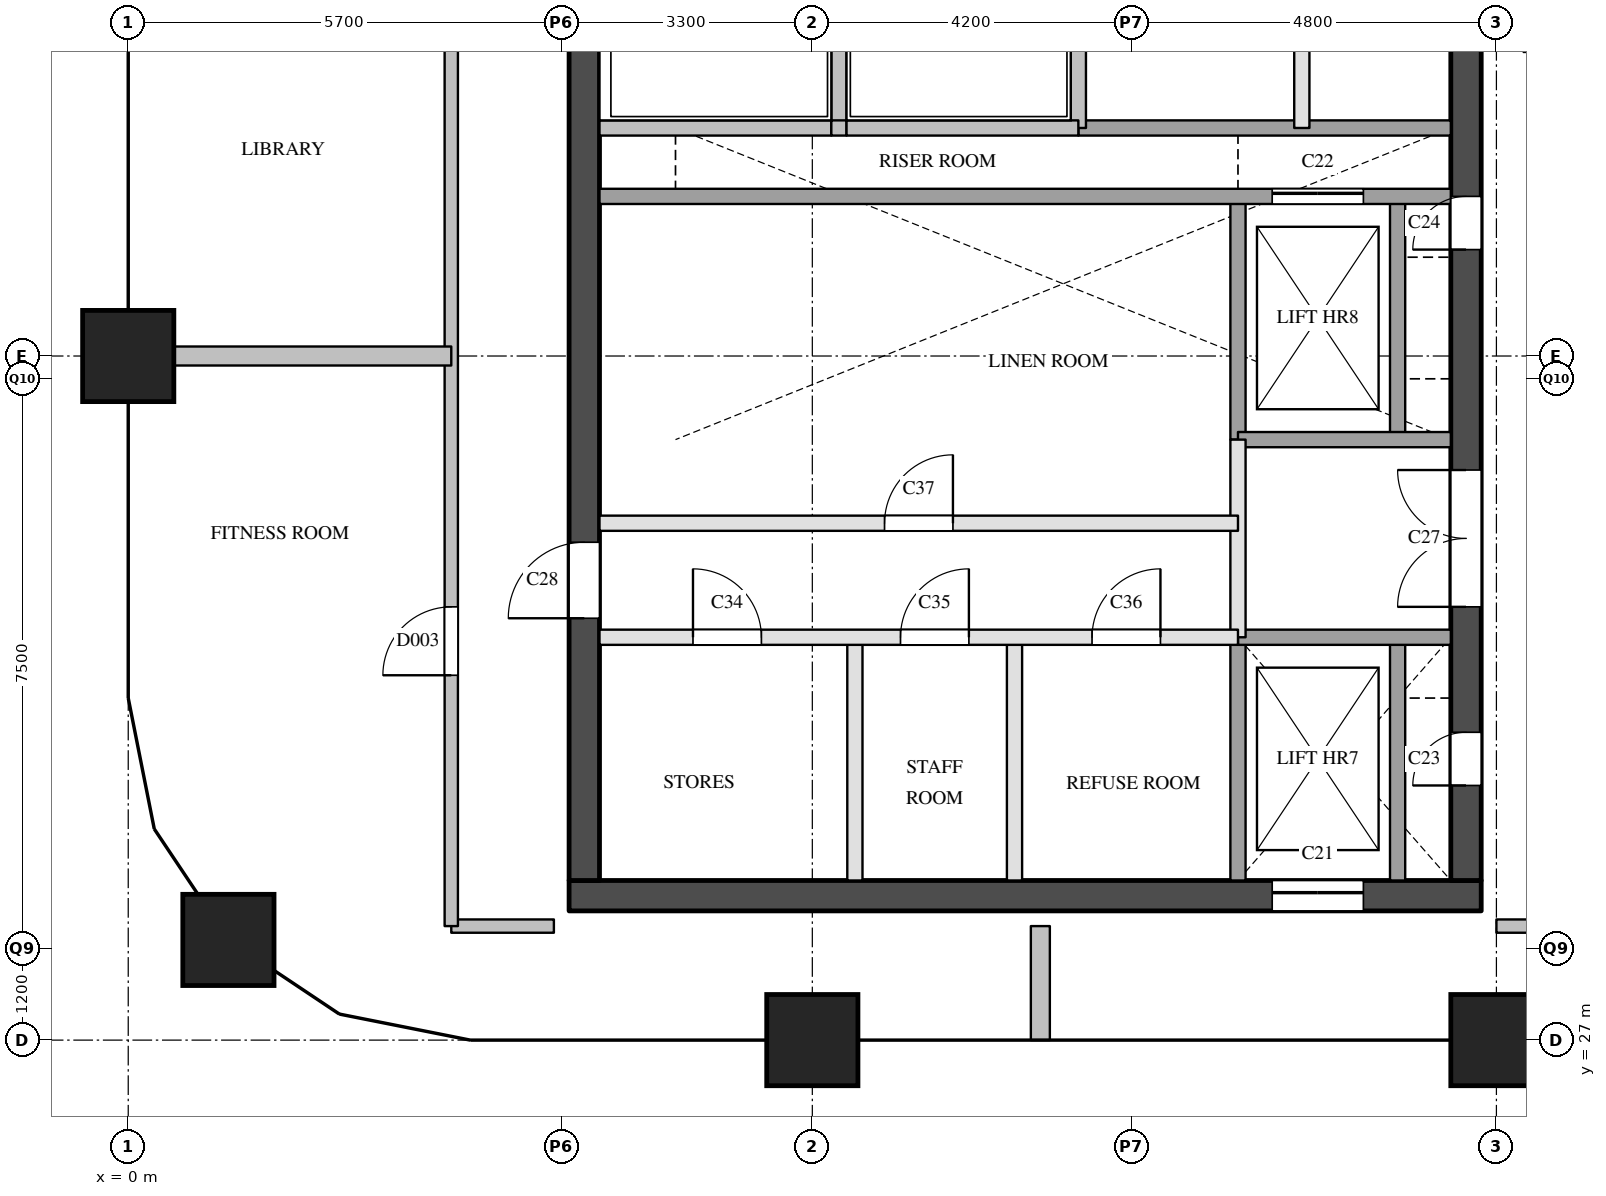
"""IFC4 building model, lengths in metres.
Left out: names, types, materials, properties, quantities, classifications, styles, units other than length and angle.
Written with IfcOpenShell. Run it as: python <this file> out.ifc"""

import sys

from ifc_helpers import new_model, si_unit, direction, frame, frame_2d, origin, origin_2d, place, context, subcontext, project, spatial, rectangle, extrude, element, fill, save


model = new_model("IFC4")
c1 = context("Model", 3, precision=1e-05, world=origin(), true_north=direction((0.0, 1.0)))
c2 = subcontext(c1, "Body", "Model", "MODEL_VIEW")
j1 = project(units=[si_unit("LENGTHUNIT", "METRE"), si_unit("PLANEANGLEUNIT", "RADIAN")], contexts=[c1])
p1 = place(None, origin())
s1 = spatial("IfcSite", under=j1, at=p1, CompositionType="ELEMENT")
p2 = place(p1, origin())
s2 = spatial("IfcBuilding", under=s1, at=p2, CompositionType="ELEMENT")
p3 = place(p2, frame((0.0, 0.0, 226.7)))
s3 = spatial("IfcBuildingStorey", under=s2, at=p3, CompositionType="ELEMENT", Elevation=226.7)
for number, where, z_axis, x_axis in (
    (1, (1.318, 28.318, 0.0), (0.0, 0.0, 1.0), (1.0, 0.0, 0.0)),
    (2, (0.0, 36.0, 0.0), (0.0, 0.0, 1.0), (1.0, 0.0, 0.0)),
    (3, (9.0, 27.0, 0.0), (0.0, 0.0, 1.0), (1.0, 0.0, 0.0)),
    (4, (18.0, 27.0, 0.0), (0.0, 0.0, 1.0), (1.0, 0.0, 0.0)),
):
    element("IfcColumn", number, at=place(p3, frame(where, z_axis=z_axis, x_axis=x_axis)), inside=s3, PredefinedType="COLUMN", context=c2, shape_type="SweptSolid", body=[
        extrude(rectangle(XDim=1.2, YDim=1.2, at=origin_2d()), origin(), (0.0, 0.0, 1.0), 3.9),
    ])
p4 = place(p3, frame((5.8, 28.9, 0.0), z_axis=(0.0, 0.0, 1.0), x_axis=(1.0, 0.0, 0.0)))
e5 = element("IfcWall", 5, at=p4, inside=s3, PredefinedType="SHEAR", context=c2, shape_type="SweptSolid", body=[
    extrude(rectangle(XDim=12.0, YDim=0.4, at=frame_2d((6.0, 0.0))), origin(), (0.0, 0.0, 1.0), 3.5),
])
p5 = place(p4, frame((9.25, 0.0, 0.0)))
e6 = element("IfcOpeningElement", 6, at=p5, cuts=e5, PredefinedType="OPENING", context=c2, shape_type="SweptSolid", body=[
    extrude(rectangle(XDim=1.2, YDim=2.1, at=frame_2d((0.6, 1.05))), frame((0.0, 0.21, 0.0), z_axis=(0.0, -1.0, 0.0), x_axis=(1.0, 0.0, 0.0)), (0.0, 0.0, 1.0), 0.42),
])
p6 = place(p3, frame((6.0, 29.1, 0.0), z_axis=(0.0, 0.0, 1.0), x_axis=(0.0, 1.0, 0.0)))
e7 = element("IfcWall", 7, at=p6, inside=s3, PredefinedType="SHEAR", context=c2, shape_type="SweptSolid", body=[
    extrude(rectangle(XDim=20.3, YDim=0.4, at=frame_2d((10.15, 0.0))), origin(), (0.0, 0.0, 1.0), 3.5),
])
p7 = place(p6, frame((3.45, 0.0, 0.0)))
e8 = element("IfcOpeningElement", 8, at=p7, cuts=e7, PredefinedType="OPENING", context=c2, shape_type="SweptSolid", body=[
    extrude(rectangle(XDim=1.0, YDim=2.1, at=frame_2d((0.5, 1.05))), frame((0.0, 0.21, 0.0), z_axis=(0.0, -1.0, 0.0), x_axis=(1.0, 0.0, 0.0)), (0.0, 0.0, 1.0), 0.42),
])
p8 = place(p6, frame((16.4, 0.0, 0.0)))
e9 = element("IfcOpeningElement", 9, at=p8, cuts=e7, PredefinedType="OPENING", context=c2, shape_type="SweptSolid", body=[
    extrude(rectangle(XDim=1.0, YDim=2.1, at=frame_2d((0.5, 1.05))), frame((0.0, 0.21, 0.0), z_axis=(0.0, -1.0, 0.0), x_axis=(1.0, 0.0, 0.0)), (0.0, 0.0, 1.0), 0.42),
])
p9 = place(p3, frame((17.6, 29.1, 0.0), z_axis=(0.0, 0.0, 1.0), x_axis=(0.0, 1.0, 0.0)))
e10 = element("IfcWall", 10, at=p9, inside=s3, PredefinedType="SHEAR", context=c2, shape_type="SweptSolid", body=[
    extrude(rectangle(XDim=20.3, YDim=0.4, at=frame_2d((10.15, 0.0))), origin(), (0.0, 0.0, 1.0), 3.5),
])
p10 = place(p9, frame((1.25, 0.0, 0.0)))
e11 = element("IfcOpeningElement", 11, at=p10, cuts=e10, PredefinedType="OPENING", context=c2, shape_type="SweptSolid", body=[
    extrude(rectangle(XDim=0.7, YDim=2.1, at=frame_2d((0.35, 1.05))), frame((0.0, 0.21, 0.0), z_axis=(0.0, -1.0, 0.0), x_axis=(1.0, 0.0, 0.0)), (0.0, 0.0, 1.0), 0.42),
])
p11 = place(p9, frame((8.3, 0.0, 0.0)))
e12 = element("IfcOpeningElement", 12, at=p11, cuts=e10, PredefinedType="OPENING", context=c2, shape_type="SweptSolid", body=[
    extrude(rectangle(XDim=0.7, YDim=2.1, at=frame_2d((0.35, 1.05))), frame((0.0, 0.21, 0.0), z_axis=(0.0, -1.0, 0.0), x_axis=(1.0, 0.0, 0.0)), (0.0, 0.0, 1.0), 0.42),
])
p12 = place(p9, frame((3.6, 0.0, 0.0)))
e13 = element("IfcOpeningElement", 13, at=p12, cuts=e10, PredefinedType="OPENING", context=c2, shape_type="SweptSolid", body=[
    extrude(rectangle(XDim=1.8, YDim=2.1, at=frame_2d((0.9, 1.05))), frame((0.0, 0.21, 0.0), z_axis=(0.0, -1.0, 0.0), x_axis=(1.0, 0.0, 0.0)), (0.0, 0.0, 1.0), 0.42),
])
p13 = place(p3, frame((9.35, 39.0, 0.0), z_axis=(0.0, 0.0, 1.0), x_axis=(0.0, 1.0, 0.0)))
e14 = element("IfcWall", 14, at=p13, inside=s3, PredefinedType="SOLIDWALL", context=c2, shape_type="SweptSolid", body=[
    extrude(rectangle(XDim=1.9, YDim=0.2, at=frame_2d((0.95, 0.0))), origin(), (0.0, 0.0, 1.0), 3.5),
])
for number, where, z_axis, x_axis in (
    (15, (9.56, 29.1, 0.0), (0.0, 0.0, 1.0), (0.0, 1.0, 0.0)),
    (16, (11.66, 29.1, 0.0), (0.0, 0.0, 1.0), (0.0, 1.0, 0.0)),
):
    element("IfcWall", number, at=place(p3, frame(where, z_axis=z_axis, x_axis=x_axis)), inside=s3, PredefinedType="PARTITIONING", context=c2, shape_type="SweptSolid", body=[
        extrude(rectangle(XDim=3.2, YDim=0.2, at=frame_2d((1.6, 0.0))), origin(), (0.0, 0.0, 1.0), 3.5),
    ])
p14 = place(p3, frame((12.5, 39.0, 0.0), z_axis=(0.0, 0.0, 1.0), x_axis=(0.0, 1.0, 0.0)))
e17 = element("IfcWall", 17, at=p14, inside=s3, PredefinedType="SOLIDWALL", context=c2, shape_type="SweptSolid", body=[
    extrude(rectangle(XDim=1.9, YDim=0.2, at=frame_2d((0.95, 0.0))), origin(), (0.0, 0.0, 1.0), 3.5),
])
p15 = place(p3, frame((14.6, 32.3, 0.0), z_axis=(0.0, 0.0, 1.0), x_axis=(0.0, 1.0, 0.0)))
e18 = element("IfcWall", 18, at=p15, inside=s3, PredefinedType="PARTITIONING", context=c2, shape_type="SweptSolid", body=[
    extrude(rectangle(XDim=2.6, YDim=0.2, at=frame_2d((1.3, 0.0))), origin(), (0.0, 0.0, 1.0), 3.5),
])
p16 = place(p3, frame((14.6, 29.1, 0.0), z_axis=(0.0, 0.0, 1.0), x_axis=(0.0, 1.0, 0.0)))
e19 = element("IfcWall", 19, at=p16, inside=s3, PredefinedType="SOLIDWALL", context=c2, shape_type="SweptSolid", body=[
    extrude(rectangle(XDim=3.2, YDim=0.2, at=frame_2d((1.6, 0.0))), origin(), (0.0, 0.0, 1.0), 3.5),
])
p17 = place(p3, frame((14.6, 34.9, 0.0), z_axis=(0.0, 0.0, 1.0), x_axis=(0.0, 1.0, 0.0)))
e20 = element("IfcWall", 20, at=p17, inside=s3, PredefinedType="SOLIDWALL", context=c2, shape_type="SweptSolid", body=[
    extrude(rectangle(XDim=3.2, YDim=0.2, at=frame_2d((1.6, 0.0))), origin(), (0.0, 0.0, 1.0), 3.5),
])
p18 = place(p3, frame((15.44, 39.0, 0.0), z_axis=(0.0, 0.0, 1.0), x_axis=(0.0, 1.0, 0.0)))
e21 = element("IfcWall", 21, at=p18, inside=s3, PredefinedType="PARTITIONING", context=c2, shape_type="SweptSolid", body=[
    extrude(rectangle(XDim=6.2, YDim=0.2, at=frame_2d((3.1, 0.0))), origin(), (0.0, 0.0, 1.0), 3.5),
])
p19 = place(p3, frame((16.7, 29.1, 0.0), z_axis=(0.0, 0.0, 1.0), x_axis=(0.0, 1.0, 0.0)))
e22 = element("IfcWall", 22, at=p19, inside=s3, PredefinedType="SOLIDWALL", context=c2, shape_type="SweptSolid", body=[
    extrude(rectangle(XDim=3.2, YDim=0.2, at=frame_2d((1.6, 0.0))), origin(), (0.0, 0.0, 1.0), 3.5),
])
p20 = place(p3, frame((16.7, 34.9, 0.0), z_axis=(0.0, 0.0, 1.0), x_axis=(0.0, 1.0, 0.0)))
e23 = element("IfcWall", 23, at=p20, inside=s3, PredefinedType="SOLIDWALL", context=c2, shape_type="SweptSolid", body=[
    extrude(rectangle(XDim=3.2, YDim=0.2, at=frame_2d((1.6, 0.0))), origin(), (0.0, 0.0, 1.0), 3.5),
])
p21 = place(p3, frame((6.2, 32.3, 0.0), z_axis=(0.0, 0.0, 1.0), x_axis=(1.0, 0.0, 0.0)))
e24 = element("IfcWall", 24, at=p21, inside=s3, PredefinedType="PARTITIONING", context=c2, shape_type="SweptSolid", body=[
    extrude(rectangle(XDim=8.4, YDim=0.2, at=frame_2d((4.2, 0.0))), origin(), (0.0, 0.0, 1.0), 3.5),
])
p22 = place(p21, frame((1.23, 0.0, 0.0)))
e25 = element("IfcOpeningElement", 25, at=p22, cuts=e24, PredefinedType="OPENING", context=c2, shape_type="SweptSolid", body=[
    extrude(rectangle(XDim=0.9, YDim=2.1, at=frame_2d((0.45, 1.05))), frame((0.0, 0.11, 0.0), z_axis=(0.0, -1.0, 0.0), x_axis=(1.0, 0.0, 0.0)), (0.0, 0.0, 1.0), 0.22),
])
p23 = place(p21, frame((3.96, 0.0, 0.0)))
e26 = element("IfcOpeningElement", 26, at=p23, cuts=e24, PredefinedType="OPENING", context=c2, shape_type="SweptSolid", body=[
    extrude(rectangle(XDim=0.9, YDim=2.1, at=frame_2d((0.45, 1.05))), frame((0.0, 0.11, 0.0), z_axis=(0.0, -1.0, 0.0), x_axis=(1.0, 0.0, 0.0)), (0.0, 0.0, 1.0), 0.22),
])
p24 = place(p21, frame((6.48, 0.0, 0.0)))
e27 = element("IfcOpeningElement", 27, at=p24, cuts=e24, PredefinedType="OPENING", context=c2, shape_type="SweptSolid", body=[
    extrude(rectangle(XDim=0.9, YDim=2.1, at=frame_2d((0.45, 1.05))), frame((0.0, 0.11, 0.0), z_axis=(0.0, -1.0, 0.0), x_axis=(1.0, 0.0, 0.0)), (0.0, 0.0, 1.0), 0.22),
])
p25 = place(p3, frame((14.6, 32.3, 0.0), z_axis=(0.0, 0.0, 1.0), x_axis=(1.0, 0.0, 0.0)))
e28 = element("IfcWall", 28, at=p25, inside=s3, PredefinedType="SOLIDWALL", context=c2, shape_type="SweptSolid", body=[
    extrude(rectangle(XDim=2.8, YDim=0.2, at=frame_2d((1.4, 0.0))), origin(), (0.0, 0.0, 1.0), 3.5),
])
p26 = place(p3, frame((6.2, 33.8, 0.0), z_axis=(0.0, 0.0, 1.0), x_axis=(1.0, 0.0, 0.0)))
e29 = element("IfcWall", 29, at=p26, inside=s3, PredefinedType="PARTITIONING", context=c2, shape_type="SweptSolid", body=[
    extrude(rectangle(XDim=8.4, YDim=0.2, at=frame_2d((4.2, 0.0))), origin(), (0.0, 0.0, 1.0), 3.5),
])
p27 = place(p26, frame((3.75, 0.0, 0.0)))
e30 = element("IfcOpeningElement", 30, at=p27, cuts=e29, PredefinedType="OPENING", context=c2, shape_type="SweptSolid", body=[
    extrude(rectangle(XDim=0.9, YDim=2.1, at=frame_2d((0.45, 1.05))), frame((0.0, 0.11, 0.0), z_axis=(0.0, -1.0, 0.0), x_axis=(1.0, 0.0, 0.0)), (0.0, 0.0, 1.0), 0.22),
])
p28 = place(p3, frame((14.6, 34.9, 0.0), z_axis=(0.0, 0.0, 1.0), x_axis=(1.0, 0.0, 0.0)))
e31 = element("IfcWall", 31, at=p28, inside=s3, PredefinedType="SOLIDWALL", context=c2, shape_type="SweptSolid", body=[
    extrude(rectangle(XDim=2.8, YDim=0.2, at=frame_2d((1.4, 0.0))), origin(), (0.0, 0.0, 1.0), 3.5),
])
p29 = place(p3, frame((6.2, 38.1, 0.0), z_axis=(0.0, 0.0, 1.0), x_axis=(1.0, 0.0, 0.0)))
e32 = element("IfcWall", 32, at=p29, inside=s3, PredefinedType="SOLIDWALL", context=c2, shape_type="SweptSolid", body=[
    extrude(rectangle(XDim=11.2, YDim=0.2, at=frame_2d((5.6, 0.0))), origin(), (0.0, 0.0, 1.0), 3.5),
])
p30 = place(p29, frame((8.85, 0.0, 0.0)))
e33 = element("IfcOpeningElement", 33, at=p30, cuts=e32, PredefinedType="OPENING", context=c2, shape_type="SweptSolid", body=[
    extrude(rectangle(XDim=1.2, YDim=2.1, at=frame_2d((0.6, 1.05))), frame((0.0, 0.11, 0.0), z_axis=(0.0, -1.0, 0.0), x_axis=(1.0, 0.0, 0.0)), (0.0, 0.0, 1.0), 0.22),
])
p31 = place(p3, frame((12.5, 39.0, 0.0), z_axis=(0.0, 0.0, 1.0), x_axis=(1.0, 0.0, 0.0)))
e34 = element("IfcWall", 34, at=p31, inside=s3, PredefinedType="SOLIDWALL", context=c2, shape_type="SweptSolid", body=[
    extrude(rectangle(XDim=4.9, YDim=0.2, at=frame_2d((2.45, 0.0))), origin(), (0.0, 0.0, 1.0), 3.5),
])
p32 = place(p3, frame((6.2, 39.0, 0.0), z_axis=(0.0, 0.0, 1.0), x_axis=(1.0, 0.0, 0.0)))
e35 = element("IfcWall", 35, at=p32, inside=s3, PredefinedType="SOLIDWALL", context=c2, shape_type="SweptSolid", body=[
    extrude(rectangle(XDim=3.05, YDim=0.2, at=frame_2d((1.525, 0.0))), origin(), (0.0, 0.0, 1.0), 3.5),
])
p33 = place(p3, frame((9.25, 39.0, 0.0), z_axis=(0.0, 0.0, 1.0), x_axis=(1.0, 0.0, 0.0)))
e36 = element("IfcWall", 36, at=p33, inside=s3, PredefinedType="SOLIDWALL", context=c2, shape_type="SweptSolid", body=[
    extrude(rectangle(XDim=0.2, YDim=0.2, at=frame_2d((0.1, 0.0))), origin(), (0.0, 0.0, 1.0), 3.5),
])
p34 = place(p3, frame((9.45, 39.0, 0.0), z_axis=(0.0, 0.0, 1.0), x_axis=(1.0, 0.0, 0.0)))
e37 = element("IfcWall", 37, at=p34, inside=s3, PredefinedType="SOLIDWALL", context=c2, shape_type="SweptSolid", body=[
    extrude(rectangle(XDim=3.05, YDim=0.2, at=frame_2d((1.525, 0.0))), origin(), (0.0, 0.0, 1.0), 3.5),
])
for number, where, z_axis, x_axis in (
    (38, (4.25, 28.5, 0.0), (0.0, 0.0, 1.0), (1.0, 0.0, 0.0)),
    (39, (18.0, 28.5, 0.0), (0.0, 0.0, 1.0), (1.0, 0.0, 0.0)),
):
    element("IfcWall", number, at=place(p3, frame(where, z_axis=z_axis, x_axis=x_axis)), inside=s3, PredefinedType="PARTITIONING", context=c2, shape_type="SweptSolid", body=[
        extrude(rectangle(XDim=1.35, YDim=0.175, at=frame_2d((0.675, 0.0))), origin(), (0.0, 0.0, 1.0), 3.5),
    ])
p35 = place(p3, frame((4.25, 28.5, 0.0), z_axis=(0.0, 0.0, 1.0), x_axis=(0.0, 1.0, 0.0)))
e40 = element("IfcWall", 40, at=p35, inside=s3, PredefinedType="PARTITIONING", context=c2, shape_type="SweptSolid", body=[
    extrude(rectangle(XDim=22.85, YDim=0.175, at=frame_2d((11.425, 0.0))), origin(), (0.0, 0.0, 1.0), 3.5),
])
p36 = place(p35, frame((3.3, 0.0, 0.0)))
e41 = element("IfcOpeningElement", 41, at=p36, cuts=e40, PredefinedType="OPENING", context=c2, shape_type="SweptSolid", body=[
    extrude(rectangle(XDim=0.9, YDim=2.1, at=frame_2d((0.45, 1.05))), frame((0.0, 0.097, 0.0), z_axis=(0.0, -1.0, 0.0), x_axis=(1.0, 0.0, 0.0)), (0.0, 0.0, 1.0), 0.195),
])
p37 = place(p35, frame((11.55, 0.0, 0.0)))
e42 = element("IfcOpeningElement", 42, at=p37, cuts=e40, PredefinedType="OPENING", context=c2, shape_type="SweptSolid", body=[
    extrude(rectangle(XDim=0.9, YDim=2.1, at=frame_2d((0.45, 1.05))), frame((0.0, 0.097, 0.0), z_axis=(0.0, -1.0, 0.0), x_axis=(1.0, 0.0, 0.0)), (0.0, 0.0, 1.0), 0.195),
])
p38 = place(p35, frame((19.225, 0.0, 0.0)))
e43 = element("IfcOpeningElement", 43, at=p38, cuts=e40, PredefinedType="OPENING", context=c2, shape_type="SweptSolid", body=[
    extrude(rectangle(XDim=0.9, YDim=2.1, at=frame_2d((0.45, 1.05))), frame((0.0, 0.097, 0.0), z_axis=(0.0, -1.0, 0.0), x_axis=(1.0, 0.0, 0.0)), (0.0, 0.0, 1.0), 0.195),
])
p39 = place(p3, frame((0.0, 36.0, 0.0), z_axis=(0.0, 0.0, 1.0), x_axis=(1.0, 0.0, 0.0)))
e44 = element("IfcWall", 44, at=p39, inside=s3, PredefinedType="PARTITIONING", context=c2, shape_type="SweptSolid", body=[
    extrude(rectangle(XDim=4.25, YDim=0.25, at=frame_2d((2.125, 0.0))), origin(), (0.0, 0.0, 1.0), 3.5),
])
p40 = place(p3, frame((12.0, 27.0, 0.0), z_axis=(0.0, 0.0, 1.0), x_axis=(0.0, 1.0, 0.0)))
e45 = element("IfcWall", 45, at=p40, inside=s3, PredefinedType="PARTITIONING", context=c2, shape_type="SweptSolid", body=[
    extrude(rectangle(XDim=1.5, YDim=0.25, at=frame_2d((0.75, 0.0))), origin(), (0.0, 0.0, 1.0), 2.5),
])
p41 = place(p5, origin())
e46 = element("IfcDoor", 46, at=p41, inside=s3, OperationType="SLIDING_TO_LEFT", PredefinedType="DOOR", context=c2, shape_type="SweptSolid", body=[
    extrude(rectangle(XDim=1.2, YDim=2.1, at=frame_2d((0.6, 1.05))), frame((0.0, 0.025, 0.0), z_axis=(0.0, -1.0, 0.0), x_axis=(1.0, 0.0, 0.0)), (0.0, 0.0, 1.0), 0.05),
])
fill(e6, e46)
p42 = place(p30, origin())
e47 = element("IfcDoor", 47, at=p42, inside=s3, OperationType="SLIDING_TO_LEFT", PredefinedType="DOOR", context=c2, shape_type="SweptSolid", body=[
    extrude(rectangle(XDim=1.2, YDim=2.1, at=frame_2d((0.6, 1.05))), frame((0.0, 0.025, 0.0), z_axis=(0.0, -1.0, 0.0), x_axis=(1.0, 0.0, 0.0)), (0.0, 0.0, 1.0), 0.05),
])
fill(e33, e47)
p43 = place(p10, origin())
e48 = element("IfcDoor", 48, at=p43, inside=s3, OperationType="SINGLE_SWING_LEFT", PredefinedType="DOOR", context=c2, shape_type="SweptSolid", body=[
    extrude(rectangle(XDim=0.7, YDim=2.1, at=frame_2d((0.35, 1.05))), frame((0.0, 0.025, 0.0), z_axis=(0.0, -1.0, 0.0), x_axis=(1.0, 0.0, 0.0)), (0.0, 0.0, 1.0), 0.05),
])
fill(e11, e48)
p44 = place(p11, origin())
e49 = element("IfcDoor", 49, at=p44, inside=s3, OperationType="SINGLE_SWING_LEFT", PredefinedType="DOOR", context=c2, shape_type="SweptSolid", body=[
    extrude(rectangle(XDim=0.7, YDim=2.1, at=frame_2d((0.35, 1.05))), frame((0.0, 0.025, 0.0), z_axis=(0.0, -1.0, 0.0), x_axis=(1.0, 0.0, 0.0)), (0.0, 0.0, 1.0), 0.05),
])
fill(e12, e49)
p45 = place(p12, origin())
e50 = element("IfcDoor", 50, at=p45, inside=s3, OperationType="DOUBLE_DOOR_SINGLE_SWING", PredefinedType="DOOR", context=c2, shape_type="SweptSolid", body=[
    extrude(rectangle(XDim=1.8, YDim=2.1, at=frame_2d((0.9, 1.05))), frame((0.0, 0.025, 0.0), z_axis=(0.0, -1.0, 0.0), x_axis=(1.0, 0.0, 0.0)), (0.0, 0.0, 1.0), 0.05),
])
fill(e13, e50)
p46 = place(p7, origin())
e51 = element("IfcDoor", 51, at=p46, inside=s3, OperationType="SINGLE_SWING_LEFT", PredefinedType="DOOR", context=c2, shape_type="SweptSolid", body=[
    extrude(rectangle(XDim=1.0, YDim=2.1, at=frame_2d((0.5, 1.05))), frame((0.0, 0.025, 0.0), z_axis=(0.0, -1.0, 0.0), x_axis=(1.0, 0.0, 0.0)), (0.0, 0.0, 1.0), 0.05),
])
fill(e8, e51)
p47 = place(p22, origin())
e52 = element("IfcDoor", 52, at=p47, inside=s3, OperationType="SINGLE_SWING_LEFT", PredefinedType="DOOR", context=c2, shape_type="SweptSolid", body=[
    extrude(rectangle(XDim=0.9, YDim=2.1, at=frame_2d((0.45, 1.05))), frame((0.0, 0.025, 0.0), z_axis=(0.0, -1.0, 0.0), x_axis=(1.0, 0.0, 0.0)), (0.0, 0.0, 1.0), 0.05),
])
fill(e25, e52)
p48 = place(p23, origin())
e53 = element("IfcDoor", 53, at=p48, inside=s3, OperationType="SINGLE_SWING_RIGHT", PredefinedType="DOOR", context=c2, shape_type="SweptSolid", body=[
    extrude(rectangle(XDim=0.9, YDim=2.1, at=frame_2d((0.45, 1.05))), frame((0.0, 0.025, 0.0), z_axis=(0.0, -1.0, 0.0), x_axis=(1.0, 0.0, 0.0)), (0.0, 0.0, 1.0), 0.05),
])
fill(e26, e53)
p49 = place(p24, origin())
e54 = element("IfcDoor", 54, at=p49, inside=s3, OperationType="SINGLE_SWING_RIGHT", PredefinedType="DOOR", context=c2, shape_type="SweptSolid", body=[
    extrude(rectangle(XDim=0.9, YDim=2.1, at=frame_2d((0.45, 1.05))), frame((0.0, 0.025, 0.0), z_axis=(0.0, -1.0, 0.0), x_axis=(1.0, 0.0, 0.0)), (0.0, 0.0, 1.0), 0.05),
])
fill(e27, e54)
p50 = place(p27, origin())
e55 = element("IfcDoor", 55, at=p50, inside=s3, OperationType="SINGLE_SWING_RIGHT", PredefinedType="DOOR", context=c2, shape_type="SweptSolid", body=[
    extrude(rectangle(XDim=0.9, YDim=2.1, at=frame_2d((0.45, 1.05))), frame((0.0, 0.025, 0.0), z_axis=(0.0, -1.0, 0.0), x_axis=(1.0, 0.0, 0.0)), (0.0, 0.0, 1.0), 0.05),
])
fill(e30, e55)
p51 = place(p36, origin())
e56 = element("IfcDoor", 56, at=p51, inside=s3, OperationType="SINGLE_SWING_LEFT", PredefinedType="DOOR", context=c2, shape_type="SweptSolid", body=[
    extrude(rectangle(XDim=0.9, YDim=2.1, at=frame_2d((0.45, 1.05))), frame((0.0, 0.025, 0.0), z_axis=(0.0, -1.0, 0.0), x_axis=(1.0, 0.0, 0.0)), (0.0, 0.0, 1.0), 0.05),
])
fill(e41, e56)
save(model, sys.argv[1])
